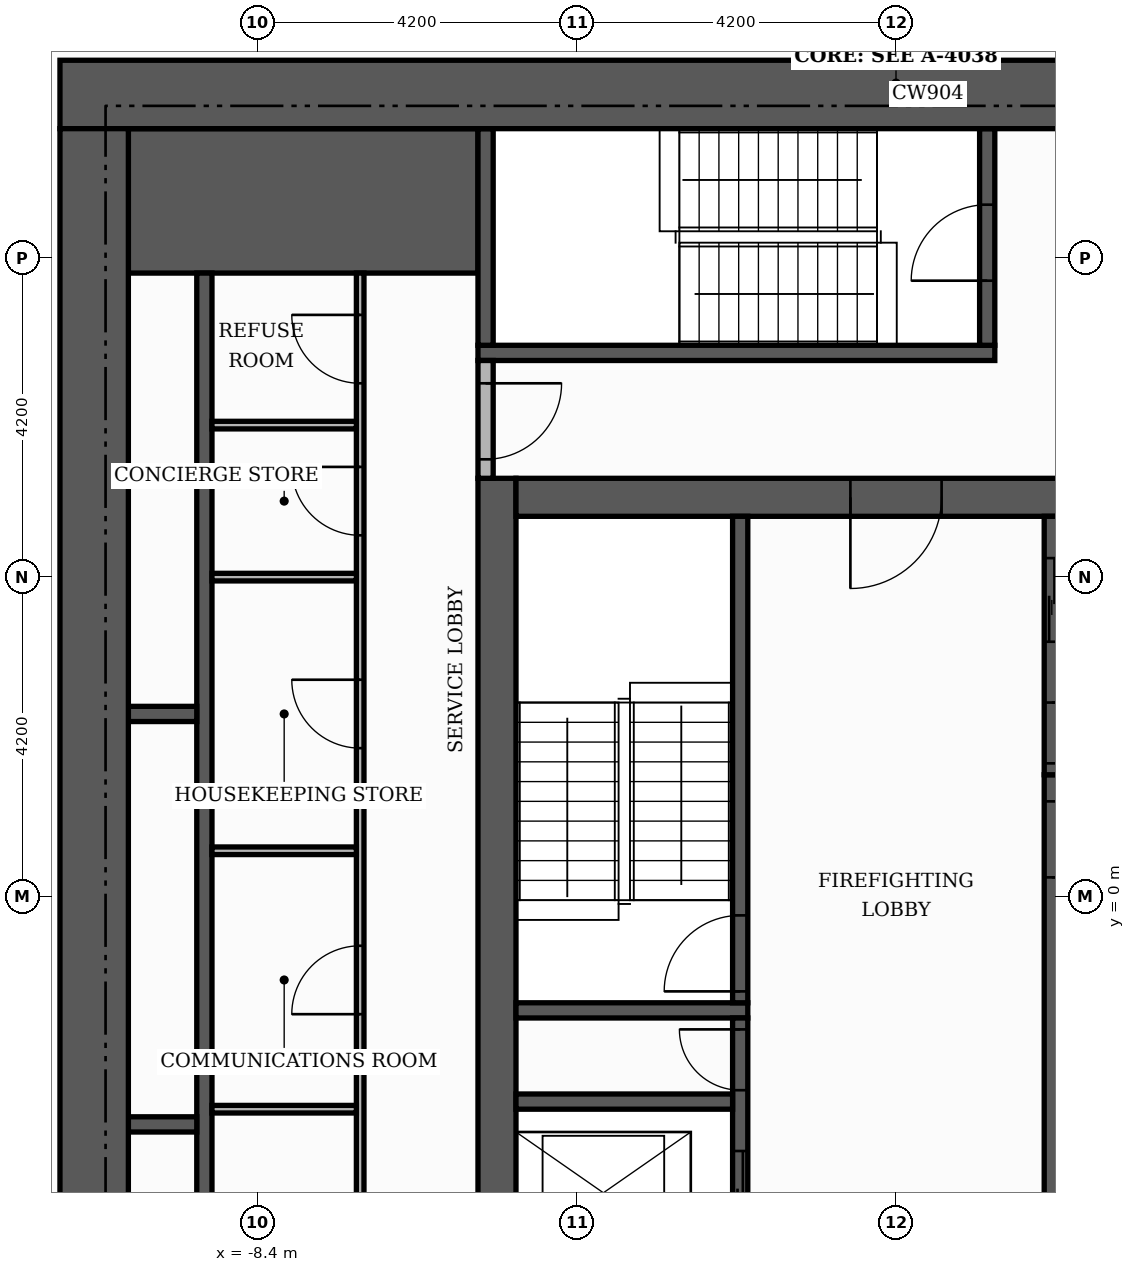
"""IFC4 building model, lengths in metres.
Left out: names, types, materials, properties, quantities, classifications, styles, units other than length and angle.
Written with IfcOpenShell. Run it as: python <this file> out.ifc"""

import sys

from ifc_helpers import new_model, si_unit, direction, frame, frame_2d, origin, place, context, subcontext, project, spatial, rectangle, extrude, element, fill, save


model = new_model("IFC4")
c1 = context("Model", 3, precision=1e-05, world=origin(), true_north=direction((0.0, 1.0)))
c2 = subcontext(c1, "Body", "Model", "MODEL_VIEW")
j1 = project(units=[si_unit("LENGTHUNIT", "METRE"), si_unit("PLANEANGLEUNIT", "RADIAN")], contexts=[c1])
p1 = place(None, origin())
s1 = spatial("IfcSite", under=j1, at=p1, CompositionType="ELEMENT")
p2 = place(p1, origin())
s2 = spatial("IfcBuilding", under=s1, at=p2, CompositionType="ELEMENT")
p3 = place(p2, frame((0.0, 0.0, 231.3)))
s3 = spatial("IfcBuildingStorey", under=s2, at=p3, CompositionType="ELEMENT", Elevation=231.3)
p4 = place(p3, frame((-5.25, -5.0, 0.0), z_axis=(0.0, 0.0, 1.0), x_axis=(0.0, 1.0, 0.0)))
e1 = element("IfcWall", 1, at=p4, inside=s3, PredefinedType="SHEAR", context=c2, shape_type="SweptSolid", body=[
    extrude(rectangle(XDim=10.5, YDim=0.5, at=frame_2d((5.25, 0.0))), origin(), (0.0, 0.0, 1.0), 3.4),
])
p5 = place(p3, frame((-5.0, 5.25, 0.0), z_axis=(0.0, 0.0, 1.0), x_axis=(1.0, 0.0, 0.0)))
e2 = element("IfcWall", 2, at=p5, inside=s3, PredefinedType="SHEAR", context=c2, shape_type="SweptSolid", body=[
    extrude(rectangle(XDim=10.0, YDim=0.5, at=frame_2d((5.0, 0.0))), origin(), (0.0, 0.0, 1.0), 3.4),
])
p6 = place(p5, frame((4.4, 0.0, 0.0)))
e3 = element("IfcOpeningElement", 3, at=p6, cuts=e2, PredefinedType="OPENING", context=c2, shape_type="SweptSolid", body=[
    extrude(rectangle(XDim=1.2, YDim=2.1, at=frame_2d((0.6, 1.05))), frame((0.0, 0.26, 0.0), z_axis=(0.0, -1.0, 0.0), x_axis=(1.0, 0.0, 0.0)), (0.0, 0.0, 1.0), 0.52),
])
p7 = place(p3, frame((-10.1, 9.15, 0.0), z_axis=(0.0, 0.0, 1.0), x_axis=(1.0, 0.0, 0.0)))
e4 = element("IfcWall", 4, at=p7, inside=s3, PredefinedType="SHEAR", context=c2, shape_type="SweptSolid", body=[
    extrude(rectangle(XDim=4.6, YDim=1.9, at=frame_2d((2.3, 0.0))), origin(), (0.0, 0.0, 1.0), 3.4),
])
p8 = place(p3, frame((2.05, -5.0, 0.0), z_axis=(0.0, 0.0, 1.0), x_axis=(0.0, 1.0, 0.0)))
e5 = element("IfcWall", 5, at=p8, inside=s3, PredefinedType="SHEAR", context=c2, shape_type="SweptSolid", body=[
    extrude(rectangle(XDim=6.6, YDim=0.2, at=frame_2d((3.3, 0.0))), origin(), (0.0, 0.0, 1.0), 3.4),
])
p9 = place(p8, frame((5.25, 0.0, 0.0)))
e6 = element("IfcOpeningElement", 6, at=p9, cuts=e5, PredefinedType="OPENING", context=c2, shape_type="SweptSolid", body=[
    extrude(rectangle(XDim=1.0, YDim=2.1, at=frame_2d((0.5, 1.05))), frame((0.0, 0.11, 0.0), z_axis=(0.0, -1.0, 0.0), x_axis=(1.0, 0.0, 0.0)), (0.0, 0.0, 1.0), 0.22),
])
p10 = place(p3, frame((-5.0, -1.5, 0.0), z_axis=(0.0, 0.0, 1.0), x_axis=(1.0, 0.0, 0.0)))
e7 = element("IfcWall", 7, at=p10, inside=s3, PredefinedType="SHEAR", context=c2, shape_type="SweptSolid", body=[
    extrude(rectangle(XDim=3.05, YDim=0.2, at=frame_2d((1.525, 0.0))), origin(), (0.0, 0.0, 1.0), 3.4),
])
p11 = place(p3, frame((-2.05, -1.4, 0.0), z_axis=(0.0, 0.0, 1.0), x_axis=(0.0, 1.0, 0.0)))
e8 = element("IfcWall", 8, at=p11, inside=s3, PredefinedType="SHEAR", context=c2, shape_type="SweptSolid", body=[
    extrude(rectangle(XDim=6.4, YDim=0.2, at=frame_2d((3.2, 0.0))), origin(), (0.0, 0.0, 1.0), 3.4),
])
p12 = place(p11, frame((0.15, 0.0, 0.0)))
e9 = element("IfcOpeningElement", 9, at=p12, cuts=e8, PredefinedType="OPENING", context=c2, shape_type="SweptSolid", body=[
    extrude(rectangle(XDim=1.0, YDim=2.1, at=frame_2d((0.5, 1.05))), frame((0.0, 0.11, 0.0), z_axis=(0.0, -1.0, 0.0), x_axis=(1.0, 0.0, 0.0)), (0.0, 0.0, 1.0), 0.22),
])
p13 = place(p3, frame((-5.5, 7.15, 0.0), z_axis=(0.0, 0.0, 1.0), x_axis=(1.0, 0.0, 0.0)))
e10 = element("IfcWall", 10, at=p13, inside=s3, PredefinedType="SHEAR", context=c2, shape_type="SweptSolid", body=[
    extrude(rectangle(XDim=6.8, YDim=0.2, at=frame_2d((3.4, 0.0))), origin(), (0.0, 0.0, 1.0), 3.4),
])
p14 = place(p3, frame((-5.4, 7.25, 0.0), z_axis=(0.0, 0.0, 1.0), x_axis=(0.0, 1.0, 0.0)))
e11 = element("IfcWall", 11, at=p14, inside=s3, PredefinedType="SHEAR", context=c2, shape_type="SweptSolid", body=[
    extrude(rectangle(XDim=2.85, YDim=0.2, at=frame_2d((1.425, 0.0))), origin(), (0.0, 0.0, 1.0), 3.4),
])
p15 = place(p3, frame((1.2, 7.25, 0.0), z_axis=(0.0, 0.0, 1.0), x_axis=(0.0, 1.0, 0.0)))
e12 = element("IfcWall", 12, at=p15, inside=s3, PredefinedType="SHEAR", context=c2, shape_type="SweptSolid", body=[
    extrude(rectangle(XDim=2.85, YDim=0.2, at=frame_2d((1.425, 0.0))), origin(), (0.0, 0.0, 1.0), 3.4),
])
p16 = place(p15, frame((0.85, 0.0, 0.0)))
e13 = element("IfcOpeningElement", 13, at=p16, cuts=e12, PredefinedType="OPENING", context=c2, shape_type="SweptSolid", body=[
    extrude(rectangle(XDim=1.0, YDim=2.1, at=frame_2d((0.5, 1.05))), frame((0.0, 0.11, 0.0), z_axis=(0.0, -1.0, 0.0), x_axis=(1.0, 0.0, 0.0)), (0.0, 0.0, 1.0), 0.22),
])
p17 = place(p3, frame((-9.1, -8.2, 0.0), z_axis=(0.0, 0.0, 1.0), x_axis=(0.0, 1.0, 0.0)))
e14 = element("IfcWall", 14, at=p17, inside=s3, PredefinedType="SHEAR", context=c2, shape_type="SweptSolid", body=[
    extrude(rectangle(XDim=16.4, YDim=0.2, at=frame_2d((8.2, 0.0))), origin(), (0.0, 0.0, 1.0), 3.4),
])
p18 = place(p3, frame((-2.05, -5.0, 0.0), z_axis=(0.0, 0.0, 1.0), x_axis=(0.0, 1.0, 0.0)))
e15 = element("IfcWall", 15, at=p18, inside=s3, PredefinedType="SHEAR", context=c2, shape_type="SweptSolid", body=[
    extrude(rectangle(XDim=3.4, YDim=0.2, at=frame_2d((1.7, 0.0))), origin(), (0.0, 0.0, 1.0), 3.4),
])
p19 = place(p18, frame((0.55, 0.0, 0.0)))
e16 = element("IfcOpeningElement", 16, at=p19, cuts=e15, PredefinedType="OPENING", context=c2, shape_type="SweptSolid", body=[
    extrude(rectangle(XDim=1.1, YDim=2.1, at=frame_2d((0.55, 1.05))), frame((0.0, 0.11, 0.0), z_axis=(0.0, -1.0, 0.0), x_axis=(1.0, 0.0, 0.0)), (0.0, 0.0, 1.0), 0.22),
])
p20 = place(p18, frame((2.45, 0.0, 0.0)))
e17 = element("IfcOpeningElement", 17, at=p20, cuts=e15, PredefinedType="OPENING", context=c2, shape_type="SweptSolid", body=[
    extrude(rectangle(XDim=0.8, YDim=2.1, at=frame_2d((0.4, 1.05))), frame((0.0, 0.11, 0.0), z_axis=(0.0, -1.0, 0.0), x_axis=(1.0, 0.0, 0.0)), (0.0, 0.0, 1.0), 0.22),
])
p21 = place(p3, frame((-10.1, -3.0, 0.0), z_axis=(0.0, 0.0, 1.0), x_axis=(1.0, 0.0, 0.0)))
e18 = element("IfcWall", 18, at=p21, inside=s3, PredefinedType="SHEAR", context=c2, shape_type="SweptSolid", body=[
    extrude(rectangle(XDim=0.9, YDim=0.2, at=frame_2d((0.45, 0.0))), origin(), (0.0, 0.0, 1.0), 3.4),
])
p22 = place(p3, frame((-5.0, -2.7, 0.0), z_axis=(0.0, 0.0, 1.0), x_axis=(1.0, 0.0, 0.0)))
e19 = element("IfcWall", 19, at=p22, inside=s3, PredefinedType="SHEAR", context=c2, shape_type="SweptSolid", body=[
    extrude(rectangle(XDim=2.85, YDim=0.2, at=frame_2d((1.425, 0.0))), origin(), (0.0, 0.0, 1.0), 3.4),
])
p23 = place(p3, frame((2.05, 1.6, 0.0), z_axis=(0.0, 0.0, 1.0), x_axis=(0.0, 1.0, 0.0)))
e20 = element("IfcWall", 20, at=p23, inside=s3, PredefinedType="SHEAR", context=c2, shape_type="SweptSolid", body=[
    extrude(rectangle(XDim=3.4, YDim=0.2, at=frame_2d((1.7, 0.0))), origin(), (0.0, 0.0, 1.0), 3.4),
])
p24 = place(p23, frame((1.75, 0.0, 0.0)))
e21 = element("IfcOpeningElement", 21, at=p24, cuts=e20, PredefinedType="OPENING", context=c2, shape_type="SweptSolid", body=[
    extrude(rectangle(XDim=1.1, YDim=2.1, at=frame_2d((0.55, 1.05))), frame((0.0, 0.11, 0.0), z_axis=(0.0, -1.0, 0.0), x_axis=(1.0, 0.0, 0.0)), (0.0, 0.0, 1.0), 0.22),
])
p25 = place(p23, frame((0.15, 0.0, 0.0)))
e22 = element("IfcOpeningElement", 22, at=p25, cuts=e20, PredefinedType="OPENING", context=c2, shape_type="SweptSolid", body=[
    extrude(rectangle(XDim=0.8, YDim=2.1, at=frame_2d((0.4, 1.05))), frame((0.0, 0.11, 0.0), z_axis=(0.0, -1.0, 0.0), x_axis=(1.0, 0.0, 0.0)), (0.0, 0.0, 1.0), 0.22),
])
p26 = place(p3, frame((-10.1, 2.4, 0.0), z_axis=(0.0, 0.0, 1.0), x_axis=(1.0, 0.0, 0.0)))
e23 = element("IfcWall", 23, at=p26, inside=s3, PredefinedType="SHEAR", context=c2, shape_type="SweptSolid", body=[
    extrude(rectangle(XDim=0.9, YDim=0.2, at=frame_2d((0.45, 0.0))), origin(), (0.0, 0.0, 1.0), 3.4),
])
p27 = place(p3, frame((-11.0, 10.55, 0.0), z_axis=(0.0, 0.0, 1.0), x_axis=(1.0, 0.0, 0.0)))
e24 = element("IfcWall", 24, at=p27, inside=s3, PredefinedType="SHEAR", context=c2, shape_type="SweptSolid", body=[
    extrude(rectangle(XDim=22.0, YDim=0.9, at=frame_2d((11.0, 0.0))), origin(), (0.0, 0.0, 1.0), 3.4),
])
p28 = place(p27, frame((13.3, 0.0, 0.0)))
e25 = element("IfcOpeningElement", 25, at=p28, cuts=e24, PredefinedType="OPENING", context=c2, shape_type="SweptSolid", body=[
    extrude(rectangle(XDim=1.8, YDim=2.2, at=frame_2d((0.9, 1.1))), frame((0.0, 0.46, 0.0), z_axis=(0.0, -1.0, 0.0), x_axis=(1.0, 0.0, 0.0)), (0.0, 0.0, 1.0), 0.92),
])
p29 = place(p3, frame((-10.55, -10.1, 0.0), z_axis=(0.0, 0.0, 1.0), x_axis=(0.0, 1.0, 0.0)))
e26 = element("IfcWall", 26, at=p29, inside=s3, PredefinedType="SHEAR", context=c2, shape_type="SweptSolid", body=[
    extrude(rectangle(XDim=20.2, YDim=0.9, at=frame_2d((10.1, 0.0))), origin(), (0.0, 0.0, 1.0), 3.4),
])
p30 = place(p3, frame((-7.05, -8.2, 0.0), z_axis=(0.0, 0.0, 1.0), x_axis=(0.0, 1.0, 0.0)))
e27 = element("IfcWall", 27, at=p30, inside=s3, PredefinedType="PARTITIONING", context=c2, shape_type="SweptSolid", body=[
    extrude(rectangle(XDim=16.4, YDim=0.1, at=frame_2d((8.2, 0.0))), origin(), (0.0, 0.0, 1.0), 3.4),
])
p31 = place(p30, frame((0.5, 0.0, 0.0)))
e28 = element("IfcOpeningElement", 28, at=p31, cuts=e27, PredefinedType="OPENING", context=c2, shape_type="SweptSolid", body=[
    extrude(rectangle(XDim=1.0, YDim=2.1, at=frame_2d((0.5, 1.05))), frame((0.0, 0.06, 0.0), z_axis=(0.0, -1.0, 0.0), x_axis=(1.0, 0.0, 0.0)), (0.0, 0.0, 1.0), 0.12),
])
p32 = place(p30, frame((3.25, 0.0, 0.0)))
e29 = element("IfcOpeningElement", 29, at=p32, cuts=e27, PredefinedType="OPENING", context=c2, shape_type="SweptSolid", body=[
    extrude(rectangle(XDim=0.9, YDim=2.1, at=frame_2d((0.45, 1.05))), frame((0.0, 0.06, 0.0), z_axis=(0.0, -1.0, 0.0), x_axis=(1.0, 0.0, 0.0)), (0.0, 0.0, 1.0), 0.12),
])
p33 = place(p30, frame((6.65, 0.0, 0.0)))
e30 = element("IfcOpeningElement", 30, at=p33, cuts=e27, PredefinedType="OPENING", context=c2, shape_type="SweptSolid", body=[
    extrude(rectangle(XDim=0.9, YDim=2.1, at=frame_2d((0.45, 1.05))), frame((0.0, 0.06, 0.0), z_axis=(0.0, -1.0, 0.0), x_axis=(1.0, 0.0, 0.0)), (0.0, 0.0, 1.0), 0.12),
])
p34 = place(p30, frame((10.15, 0.0, 0.0)))
e31 = element("IfcOpeningElement", 31, at=p34, cuts=e27, PredefinedType="OPENING", context=c2, shape_type="SweptSolid", body=[
    extrude(rectangle(XDim=0.9, YDim=2.1, at=frame_2d((0.45, 1.05))), frame((0.0, 0.06, 0.0), z_axis=(0.0, -1.0, 0.0), x_axis=(1.0, 0.0, 0.0)), (0.0, 0.0, 1.0), 0.12),
])
p35 = place(p30, frame((12.95, 0.0, 0.0)))
e32 = element("IfcOpeningElement", 32, at=p35, cuts=e27, PredefinedType="OPENING", context=c2, shape_type="SweptSolid", body=[
    extrude(rectangle(XDim=0.9, YDim=2.1, at=frame_2d((0.45, 1.05))), frame((0.0, 0.06, 0.0), z_axis=(0.0, -1.0, 0.0), x_axis=(1.0, 0.0, 0.0)), (0.0, 0.0, 1.0), 0.12),
])
p36 = place(p30, frame((14.95, 0.0, 0.0)))
e33 = element("IfcOpeningElement", 33, at=p36, cuts=e27, PredefinedType="OPENING", context=c2, shape_type="SweptSolid", body=[
    extrude(rectangle(XDim=0.9, YDim=2.1, at=frame_2d((0.45, 1.05))), frame((0.0, 0.06, 0.0), z_axis=(0.0, -1.0, 0.0), x_axis=(1.0, 0.0, 0.0)), (0.0, 0.0, 1.0), 0.12),
])
for number, where, z_axis, x_axis in (
    (34, (-9.0, -2.8, 0.0), (0.0, 0.0, 1.0), (1.0, 0.0, 0.0)),
    (35, (-9.0, 0.6, 0.0), (0.0, 0.0, 1.0), (1.0, 0.0, 0.0)),
    (36, (-9.0, 4.2, 0.0), (0.0, 0.0, 1.0), (1.0, 0.0, 0.0)),
):
    element("IfcWall", number, at=place(p3, frame(where, z_axis=z_axis, x_axis=x_axis)), inside=s3, PredefinedType="PARTITIONING", context=c2, shape_type="SweptSolid", body=[
        extrude(rectangle(XDim=1.9, YDim=0.1, at=frame_2d((0.95, 0.0))), origin(), (0.0, 0.0, 1.0), 3.4),
    ])
p37 = place(p3, frame((-5.4, 5.5, 0.0), z_axis=(0.0, 0.0, 1.0), x_axis=(0.0, 1.0, 0.0)))
e37 = element("IfcWall", 37, at=p37, inside=s3, PredefinedType="PARTITIONING", context=c2, shape_type="SweptSolid", body=[
    extrude(rectangle(XDim=1.55, YDim=0.2, at=frame_2d((0.775, 0.0))), origin(), (0.0, 0.0, 1.0), 3.4),
])
p38 = place(p37, frame((0.25, 0.0, 0.0)))
e38 = element("IfcOpeningElement", 38, at=p38, cuts=e37, PredefinedType="OPENING", context=c2, shape_type="SweptSolid", body=[
    extrude(rectangle(XDim=1.0, YDim=2.1, at=frame_2d((0.5, 1.05))), frame((0.0, 0.11, 0.0), z_axis=(0.0, -1.0, 0.0), x_axis=(1.0, 0.0, 0.0)), (0.0, 0.0, 1.0), 0.22),
])
p39 = place(p3, frame((-9.0, 6.2, 0.0), z_axis=(0.0, 0.0, 1.0), x_axis=(1.0, 0.0, 0.0)))
e39 = element("IfcWall", 39, at=p39, inside=s3, PredefinedType="PARTITIONING", context=c2, shape_type="SweptSolid", body=[
    extrude(rectangle(XDim=1.9, YDim=0.1, at=frame_2d((0.95, 0.0))), origin(), (0.0, 0.0, 1.0), 3.4),
])
p40 = place(p24, origin())
e40 = element("IfcDoor", 40, at=p40, inside=s3, OperationType="SLIDING_TO_LEFT", PredefinedType="DOOR", context=c2, shape_type="SweptSolid", body=[
    extrude(rectangle(XDim=1.1, YDim=2.1, at=frame_2d((0.55, 1.05))), frame((0.0, 0.025, 0.0), z_axis=(0.0, -1.0, 0.0), x_axis=(1.0, 0.0, 0.0)), (0.0, 0.0, 1.0), 0.05),
])
fill(e21, e40)
p41 = place(p19, origin())
e41 = element("IfcDoor", 41, at=p41, inside=s3, OperationType="SLIDING_TO_LEFT", PredefinedType="DOOR", context=c2, shape_type="SweptSolid", body=[
    extrude(rectangle(XDim=1.1, YDim=2.1, at=frame_2d((0.55, 1.05))), frame((0.0, 0.025, 0.0), z_axis=(0.0, -1.0, 0.0), x_axis=(1.0, 0.0, 0.0)), (0.0, 0.0, 1.0), 0.05),
])
fill(e16, e41)
p42 = place(p12, origin())
e42 = element("IfcDoor", 42, at=p42, inside=s3, OperationType="SINGLE_SWING_LEFT", PredefinedType="DOOR", context=c2, shape_type="SweptSolid", body=[
    extrude(rectangle(XDim=1.0, YDim=2.1, at=frame_2d((0.5, 1.05))), frame((0.0, 0.025, 0.0), z_axis=(0.0, -1.0, 0.0), x_axis=(1.0, 0.0, 0.0)), (0.0, 0.0, 1.0), 0.05),
])
fill(e9, e42)
p43 = place(p9, frame((1.0, 0.0, 0.0), z_axis=(0.0, 0.0, 1.0), x_axis=(-1.0, 0.0, 0.0)))
e43 = element("IfcDoor", 43, at=p43, inside=s3, OperationType="SINGLE_SWING_LEFT", PredefinedType="DOOR", context=c2, shape_type="SweptSolid", body=[
    extrude(rectangle(XDim=1.0, YDim=2.1, at=frame_2d((0.5, 1.05))), frame((0.0, 0.025, 0.0), z_axis=(0.0, -1.0, 0.0), x_axis=(1.0, 0.0, 0.0)), (0.0, 0.0, 1.0), 0.05),
])
fill(e6, e43)
p44 = place(p25, frame((0.8, 0.0, 0.0), z_axis=(0.0, 0.0, 1.0), x_axis=(-1.0, 0.0, 0.0)))
e44 = element("IfcDoor", 44, at=p44, inside=s3, OperationType="SINGLE_SWING_RIGHT", PredefinedType="DOOR", context=c2, shape_type="SweptSolid", body=[
    extrude(rectangle(XDim=0.8, YDim=2.1, at=frame_2d((0.4, 1.05))), frame((0.0, 0.025, 0.0), z_axis=(0.0, -1.0, 0.0), x_axis=(1.0, 0.0, 0.0)), (0.0, 0.0, 1.0), 0.05),
])
fill(e22, e44)
p45 = place(p20, origin())
e45 = element("IfcDoor", 45, at=p45, inside=s3, OperationType="SINGLE_SWING_RIGHT", PredefinedType="DOOR", context=c2, shape_type="SweptSolid", body=[
    extrude(rectangle(XDim=0.8, YDim=2.1, at=frame_2d((0.4, 1.05))), frame((0.0, 0.025, 0.0), z_axis=(0.0, -1.0, 0.0), x_axis=(1.0, 0.0, 0.0)), (0.0, 0.0, 1.0), 0.05),
])
fill(e17, e45)
p46 = place(p6, frame((1.2, 0.0, 0.0), z_axis=(0.0, 0.0, 1.0), x_axis=(-1.0, 0.0, 0.0)))
e46 = element("IfcDoor", 46, at=p46, inside=s3, OperationType="SINGLE_SWING_LEFT", PredefinedType="DOOR", context=c2, shape_type="SweptSolid", body=[
    extrude(rectangle(XDim=1.2, YDim=2.1, at=frame_2d((0.6, 1.05))), frame((0.0, 0.025, 0.0), z_axis=(0.0, -1.0, 0.0), x_axis=(1.0, 0.0, 0.0)), (0.0, 0.0, 1.0), 0.05),
])
fill(e3, e46)
p47 = place(p16, origin())
e47 = element("IfcDoor", 47, at=p47, inside=s3, OperationType="SINGLE_SWING_LEFT", PredefinedType="DOOR", context=c2, shape_type="SweptSolid", body=[
    extrude(rectangle(XDim=1.0, YDim=2.1, at=frame_2d((0.5, 1.05))), frame((0.0, 0.025, 0.0), z_axis=(0.0, -1.0, 0.0), x_axis=(1.0, 0.0, 0.0)), (0.0, 0.0, 1.0), 0.05),
])
fill(e13, e47)
p48 = place(p38, frame((1.0, 0.0, 0.0), z_axis=(0.0, 0.0, 1.0), x_axis=(-1.0, 0.0, 0.0)))
e48 = element("IfcDoor", 48, at=p48, inside=s3, OperationType="SINGLE_SWING_RIGHT", PredefinedType="DOOR", context=c2, shape_type="SweptSolid", body=[
    extrude(rectangle(XDim=1.0, YDim=2.1, at=frame_2d((0.5, 1.05))), frame((0.0, 0.025, 0.0), z_axis=(0.0, -1.0, 0.0), x_axis=(1.0, 0.0, 0.0)), (0.0, 0.0, 1.0), 0.05),
])
fill(e38, e48)
p49 = place(p33, origin())
e49 = element("IfcDoor", 49, at=p49, inside=s3, OperationType="SINGLE_SWING_LEFT", PredefinedType="DOOR", context=c2, shape_type="SweptSolid", body=[
    extrude(rectangle(XDim=0.9, YDim=2.1, at=frame_2d((0.45, 1.05))), frame((0.0, 0.025, 0.0), z_axis=(0.0, -1.0, 0.0), x_axis=(1.0, 0.0, 0.0)), (0.0, 0.0, 1.0), 0.05),
])
fill(e30, e49)
p50 = place(p34, origin())
e50 = element("IfcDoor", 50, at=p50, inside=s3, OperationType="SINGLE_SWING_RIGHT", PredefinedType="DOOR", context=c2, shape_type="SweptSolid", body=[
    extrude(rectangle(XDim=0.9, YDim=2.1, at=frame_2d((0.45, 1.05))), frame((0.0, 0.025, 0.0), z_axis=(0.0, -1.0, 0.0), x_axis=(1.0, 0.0, 0.0)), (0.0, 0.0, 1.0), 0.05),
])
fill(e31, e50)
p51 = place(p35, origin())
e51 = element("IfcDoor", 51, at=p51, inside=s3, OperationType="SINGLE_SWING_RIGHT", PredefinedType="DOOR", context=c2, shape_type="SweptSolid", body=[
    extrude(rectangle(XDim=0.9, YDim=2.1, at=frame_2d((0.45, 1.05))), frame((0.0, 0.025, 0.0), z_axis=(0.0, -1.0, 0.0), x_axis=(1.0, 0.0, 0.0)), (0.0, 0.0, 1.0), 0.05),
])
fill(e32, e51)
p52 = place(p36, origin())
e52 = element("IfcDoor", 52, at=p52, inside=s3, OperationType="SINGLE_SWING_RIGHT", PredefinedType="DOOR", context=c2, shape_type="SweptSolid", body=[
    extrude(rectangle(XDim=0.9, YDim=2.1, at=frame_2d((0.45, 1.05))), frame((0.0, 0.025, 0.0), z_axis=(0.0, -1.0, 0.0), x_axis=(1.0, 0.0, 0.0)), (0.0, 0.0, 1.0), 0.05),
])
fill(e33, e52)
save(model, sys.argv[1])
